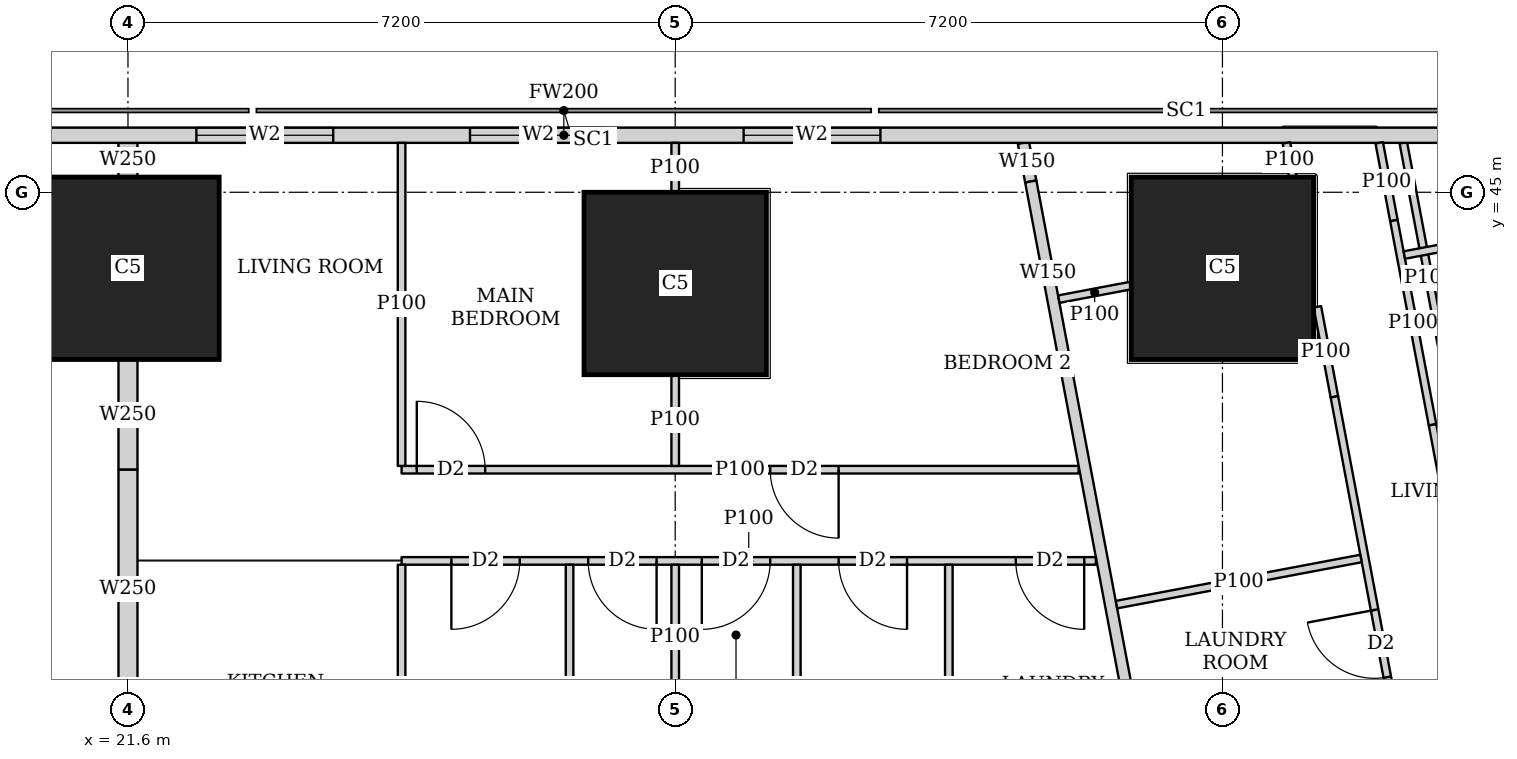
"""IFC4 building model, lengths in metres.
Left out: names, types, materials, properties, quantities, classifications, styles, units other than length and angle.
Written with IfcOpenShell. Run it as: python <this file> out.ifc"""

import sys

from ifc_helpers import new_model, si_unit, direction, frame, frame_2d, origin, origin_2d, place, context, subcontext, project, spatial, rectangle, extrude, element, fill, save


model = new_model("IFC4")
c1 = context("Model", 3, precision=1e-05, world=origin(), true_north=direction((0.0, 1.0)))
c2 = subcontext(c1, "Body", "Model", "MODEL_VIEW")
j1 = project(units=[si_unit("LENGTHUNIT", "METRE"), si_unit("PLANEANGLEUNIT", "RADIAN")], contexts=[c1])
p1 = place(None, origin())
s1 = spatial("IfcSite", under=j1, at=p1, CompositionType="ELEMENT")
p2 = place(p1, origin())
s2 = spatial("IfcBuilding", under=s1, at=p2, CompositionType="ELEMENT")
p3 = place(p2, frame((0.0, 0.0, 234.95)))
s3 = spatial("IfcBuildingStorey", under=s2, at=p3, CompositionType="ELEMENT", Elevation=234.95)
for number, where, z_axis, x_axis in (
    (1, (21.6, 44.0, 0.0), (0.0, 0.0, 1.0), (1.0, 0.0, 0.0)),
    (2, (28.8, 43.8, 0.0), (0.0, 0.0, 1.0), (1.0, 0.0, 0.0)),
    (3, (36.0, 44.0, 0.0), (0.0, 0.0, 1.0), (1.0, 0.0, 0.0)),
):
    element("IfcColumn", number, at=place(p3, frame(where, z_axis=z_axis, x_axis=x_axis)), inside=s3, PredefinedType="COLUMN", context=c2, shape_type="SweptSolid", body=[
        extrude(rectangle(XDim=2.4, YDim=2.4, at=origin_2d()), origin(), (0.0, 0.0, 1.0), 3.75),
    ])
p4 = place(p3, frame((40.106, 45.75, 0.0), z_axis=(0.0, 0.0, 1.0), x_axis=(-1.0, 0.0, 0.0)))
e4 = element("IfcWall", 4, at=p4, inside=s3, PredefinedType="SOLIDWALL", context=c2, shape_type="SweptSolid", body=[
    extrude(rectangle(XDim=25.543, YDim=0.2, at=frame_2d((12.771, 0.0))), origin(), (0.0, 0.0, 1.0), 3.5),
])
p5 = place(p4, frame((8.606, 0.0, 0.9)))
e5 = element("IfcOpeningElement", 5, at=p5, cuts=e4, PredefinedType="OPENING", context=c2, shape_type="SweptSolid", body=[
    extrude(rectangle(XDim=1.8, YDim=1.5, at=frame_2d((0.9, 0.75))), frame((0.0, 0.11, 0.0), z_axis=(0.0, -1.0, 0.0), x_axis=(1.0, 0.0, 0.0)), (0.0, 0.0, 1.0), 0.22),
])
p6 = place(p4, frame((12.206, 0.0, 0.9)))
e6 = element("IfcOpeningElement", 6, at=p6, cuts=e4, PredefinedType="OPENING", context=c2, shape_type="SweptSolid", body=[
    extrude(rectangle(XDim=1.8, YDim=1.5, at=frame_2d((0.9, 0.75))), frame((0.0, 0.11, 0.0), z_axis=(0.0, -1.0, 0.0), x_axis=(1.0, 0.0, 0.0)), (0.0, 0.0, 1.0), 0.22),
])
p7 = place(p4, frame((15.806, 0.0, 0.9)))
e7 = element("IfcOpeningElement", 7, at=p7, cuts=e4, PredefinedType="OPENING", context=c2, shape_type="SweptSolid", body=[
    extrude(rectangle(XDim=1.8, YDim=1.5, at=frame_2d((0.9, 0.75))), frame((0.0, 0.11, 0.0), z_axis=(0.0, -1.0, 0.0), x_axis=(1.0, 0.0, 0.0)), (0.0, 0.0, 1.0), 0.22),
])
p8 = place(p4, frame((20.825, 0.0, 0.9)))
e8 = element("IfcOpeningElement", 8, at=p8, cuts=e4, PredefinedType="OPENING", context=c2, shape_type="SweptSolid", body=[
    extrude(rectangle(XDim=2.4, YDim=1.5, at=frame_2d((1.2, 0.75))), frame((0.0, 0.11, 0.0), z_axis=(0.0, -1.0, 0.0), x_axis=(1.0, 0.0, 0.0)), (0.0, 0.0, 1.0), 0.22),
])
p9 = place(p3, frame((33.382, 45.65, 0.0), z_axis=(0.0, 0.0, 1.0), x_axis=(0.185657456326, -0.982614527122, 0.0)))
e9 = element("IfcWall", 9, at=p9, inside=s3, PredefinedType="SOLIDWALL", context=c2, shape_type="SweptSolid", body=[
    extrude(rectangle(XDim=0.517, YDim=0.15, at=frame_2d((0.258, 0.0))), origin(), (0.0, 0.0, 1.0), 3.5),
])
p10 = place(p3, frame((33.478, 45.142, 0.0), z_axis=(0.0, 0.0, 1.0), x_axis=(0.185393362436, -0.982664388876, 0.0)))
e10 = element("IfcWall", 10, at=p10, inside=s3, PredefinedType="SOLIDWALL", context=c2, shape_type="SweptSolid", body=[
    extrude(rectangle(XDim=2.455, YDim=0.15, at=frame_2d((1.227, 0.0))), origin(), (0.0, 0.0, 1.0), 2.05),
])
p11 = place(p3, frame((33.933, 42.73, 0.0), z_axis=(0.0, 0.0, 1.0), x_axis=(0.185595417643, -0.982626246825, 0.0)))
e11 = element("IfcWall", 11, at=p11, inside=s3, PredefinedType="SOLIDWALL", context=c2, shape_type="SweptSolid", body=[
    extrude(rectangle(XDim=41.051, YDim=0.15, at=frame_2d((20.525, 0.0))), origin(), (0.0, 0.0, 1.0), 2.5),
])
p12 = place(p11, frame((12.266, 0.0, 0.0)))
e12 = element("IfcOpeningElement", 12, at=p12, cuts=e11, PredefinedType="OPENING", context=c2, shape_type="SweptSolid", body=[
    extrude(rectangle(XDim=1.0, YDim=2.1, at=frame_2d((0.5, 1.05))), frame((0.0, 0.085, 0.0), z_axis=(0.0, -1.0, 0.0), x_axis=(1.0, 0.0, 0.0)), (0.0, 0.0, 1.0), 0.17),
])
p13 = place(p11, frame((16.082, 0.0, 0.0)))
e13 = element("IfcOpeningElement", 13, at=p13, cuts=e11, PredefinedType="OPENING", context=c2, shape_type="SweptSolid", body=[
    extrude(rectangle(XDim=1.0, YDim=2.1, at=frame_2d((0.5, 1.05))), frame((0.0, 0.085, 0.0), z_axis=(0.0, -1.0, 0.0), x_axis=(1.0, 0.0, 0.0)), (0.0, 0.0, 1.0), 0.17),
])
p14 = place(p11, frame((30.862, 0.0, 0.0)))
e14 = element("IfcOpeningElement", 14, at=p14, cuts=e11, PredefinedType="OPENING", context=c2, shape_type="SweptSolid", body=[
    extrude(rectangle(XDim=1.0, YDim=2.1, at=frame_2d((0.5, 1.05))), frame((0.0, 0.085, 0.0), z_axis=(0.0, -1.0, 0.0), x_axis=(1.0, 0.0, 0.0)), (0.0, 0.0, 1.0), 0.17),
])
p15 = place(p3, frame((39.054, 42.085, 0.0), z_axis=(0.0, 0.0, 1.0), x_axis=(-0.185791584218, 0.982589175207, 0.0)))
e15 = element("IfcWall", 15, at=p15, inside=s3, PredefinedType="PARTITIONING", context=c2, shape_type="SweptSolid", body=[
    extrude(rectangle(XDim=3.628, YDim=0.1, at=frame_2d((1.814, 0.0))), origin(), (0.0, 0.0, 1.0), 2.05),
])
p16 = place(p3, frame((38.063, 45.65, 0.0), z_axis=(0.0, 0.0, 1.0), x_axis=(0.185677287841, -0.982610779902, 0.0)))
e16 = element("IfcWall", 16, at=p16, inside=s3, PredefinedType="PARTITIONING", context=c2, shape_type="SweptSolid", body=[
    extrude(rectangle(XDim=1.04, YDim=0.1, at=frame_2d((0.52, 0.0))), origin(), (0.0, 0.0, 1.0), 3.5),
])
p17 = place(p3, frame((38.256, 44.628, 0.0), z_axis=(0.0, 0.0, 1.0), x_axis=(0.185700639943, -0.982606366927, 0.0)))
e17 = element("IfcWall", 17, at=p17, inside=s3, PredefinedType="PARTITIONING", context=c2, shape_type="SweptSolid", body=[
    extrude(rectangle(XDim=2.735, YDim=0.1, at=frame_2d((1.367, 0.0))), origin(), (0.0, 0.0, 1.0), 2.05),
])
p18 = place(p3, frame((38.764, 41.941, 0.0), z_axis=(0.0, 0.0, 1.0), x_axis=(0.185548572312, -0.982635093671, 0.0)))
e18 = element("IfcWall", 18, at=p18, inside=s3, PredefinedType="PARTITIONING", context=c2, shape_type="SweptSolid", body=[
    extrude(rectangle(XDim=9.135, YDim=0.1, at=frame_2d((4.568, 0.0))), origin(), (0.0, 0.0, 1.0), 3.5),
])
p19 = place(p18, frame((8.085, 0.0, 0.0)))
e19 = element("IfcOpeningElement", 19, at=p19, cuts=e18, PredefinedType="OPENING", context=c2, shape_type="SweptSolid", body=[
    extrude(rectangle(XDim=0.9, YDim=2.1, at=frame_2d((0.45, 1.05))), frame((0.0, 0.06, 0.0), z_axis=(0.0, -1.0, 0.0), x_axis=(1.0, 0.0, 0.0)), (0.0, 0.0, 1.0), 0.12),
])
p20 = place(p18, frame((3.7, 0.0, 0.0)))
e20 = element("IfcOpeningElement", 20, at=p20, cuts=e18, PredefinedType="OPENING", context=c2, shape_type="SweptSolid", body=[
    extrude(rectangle(XDim=0.9, YDim=2.1, at=frame_2d((0.45, 1.05))), frame((0.0, 0.06, 0.0), z_axis=(0.0, -1.0, 0.0), x_axis=(1.0, 0.0, 0.0)), (0.0, 0.0, 1.0), 0.12),
])
p21 = place(p3, frame((36.842, 45.65, 0.0), z_axis=(0.0, 0.0, 1.0), x_axis=(0.185407859198, -0.982661653748, 0.0)))
e21 = element("IfcWall", 21, at=p21, inside=s3, PredefinedType="PARTITIONING", context=c2, shape_type="SweptSolid", body=[
    extrude(rectangle(XDim=0.448, YDim=0.1, at=frame_2d((0.224, 0.0))), origin(), (0.0, 0.0, 1.0), 3.5),
])
p22 = place(p3, frame((37.249, 43.493, 0.0), z_axis=(0.0, 0.0, 1.0), x_axis=(0.185817643817, -0.982584247404, 0.0)))
e22 = element("IfcWall", 22, at=p22, inside=s3, PredefinedType="PARTITIONING", context=c2, shape_type="SweptSolid", body=[
    extrude(rectangle(XDim=1.205, YDim=0.1, at=frame_2d((0.603, 0.0))), origin(), (0.0, 0.0, 1.0), 2.05),
])
p23 = place(p3, frame((37.473, 42.309, 0.0), z_axis=(0.0, 0.0, 1.0), x_axis=(0.185491912953, -0.982645790827, 0.0)))
e23 = element("IfcWall", 23, at=p23, inside=s3, PredefinedType="PARTITIONING", context=c2, shape_type="SweptSolid", body=[
    extrude(rectangle(XDim=9.737, YDim=0.1, at=frame_2d((4.869, 0.0))), origin(), (0.0, 0.0, 1.0), 3.5),
])
p24 = place(p23, frame((8.232, 0.0, 0.0)))
e24 = element("IfcOpeningElement", 24, at=p24, cuts=e23, PredefinedType="OPENING", context=c2, shape_type="SweptSolid", body=[
    extrude(rectangle(XDim=0.9, YDim=2.1, at=frame_2d((0.45, 1.05))), frame((0.0, 0.06, 0.0), z_axis=(0.0, -1.0, 0.0), x_axis=(1.0, 0.0, 0.0)), (0.0, 0.0, 1.0), 0.12),
])
p25 = place(p23, frame((2.853, 0.0, 0.0)))
e25 = element("IfcOpeningElement", 25, at=p25, cuts=e23, PredefinedType="OPENING", context=c2, shape_type="SweptSolid", body=[
    extrude(rectangle(XDim=0.9, YDim=2.1, at=frame_2d((0.45, 1.05))), frame((0.0, 0.06, 0.0), z_axis=(0.0, -1.0, 0.0), x_axis=(1.0, 0.0, 0.0)), (0.0, 0.0, 1.0), 0.12),
])
p26 = place(p23, frame((5.564, 0.0, 0.0)))
e26 = element("IfcOpeningElement", 26, at=p26, cuts=e23, PredefinedType="OPENING", context=c2, shape_type="SweptSolid", body=[
    extrude(rectangle(XDim=0.9, YDim=2.1, at=frame_2d((0.45, 1.05))), frame((0.0, 0.06, 0.0), z_axis=(0.0, -1.0, 0.0), x_axis=(1.0, 0.0, 0.0)), (0.0, 0.0, 1.0), 0.12),
])
p27 = place(p3, frame((41.968, 44.85, 0.0), z_axis=(0.0, 0.0, 1.0), x_axis=(-0.98258614234, -0.185807623311, 0.0)))
e27 = element("IfcWall", 27, at=p27, inside=s3, PredefinedType="PARTITIONING", context=c2, shape_type="SweptSolid", body=[
    extrude(rectangle(XDim=3.638, YDim=0.1, at=frame_2d((1.819, 0.0))), origin(), (0.0, 0.0, 1.0), 2.05),
])
p28 = place(p3, frame((34.79, 43.772, 0.0), z_axis=(0.0, 0.0, 1.0), x_axis=(-0.982655532093, -0.185440301034, 0.0)))
e28 = element("IfcWall", 28, at=p28, inside=s3, PredefinedType="PARTITIONING", context=c2, shape_type="SweptSolid", body=[
    extrude(rectangle(XDim=0.96, YDim=0.1, at=frame_2d((0.48, 0.0))), origin(), (0.0, 0.0, 1.0), 2.05),
])
p29 = place(p3, frame((37.823, 40.182, 0.0), z_axis=(0.0, 0.0, 1.0), x_axis=(-0.982664729897, -0.18539155487, 0.0)))
e29 = element("IfcWall", 29, at=p29, inside=s3, PredefinedType="PARTITIONING", context=c2, shape_type="SweptSolid", body=[
    extrude(rectangle(XDim=3.274, YDim=0.1, at=frame_2d((1.637, 0.0))), origin(), (0.0, 0.0, 1.0), 3.5),
])
p30 = place(p3, frame((25.2, 41.35, 0.0), z_axis=(0.0, 0.0, 1.0), x_axis=(1.0, 0.0, 0.0)))
e30 = element("IfcWall", 30, at=p30, inside=s3, PredefinedType="PARTITIONING", context=c2, shape_type="SweptSolid", body=[
    extrude(rectangle(XDim=8.908, YDim=0.1, at=frame_2d((4.454, 0.0))), origin(), (0.0, 0.0, 1.0), 3.5),
])
p31 = place(p30, frame((0.2, 0.0, 0.0)))
e31 = element("IfcOpeningElement", 31, at=p31, cuts=e30, PredefinedType="OPENING", context=c2, shape_type="SweptSolid", body=[
    extrude(rectangle(XDim=0.9, YDim=2.1, at=frame_2d((0.45, 1.05))), frame((0.0, 0.06, 0.0), z_axis=(0.0, -1.0, 0.0), x_axis=(1.0, 0.0, 0.0)), (0.0, 0.0, 1.0), 0.12),
])
p32 = place(p30, frame((4.85, 0.0, 0.0)))
e32 = element("IfcOpeningElement", 32, at=p32, cuts=e30, PredefinedType="OPENING", context=c2, shape_type="SweptSolid", body=[
    extrude(rectangle(XDim=0.9, YDim=2.1, at=frame_2d((0.45, 1.05))), frame((0.0, 0.06, 0.0), z_axis=(0.0, -1.0, 0.0), x_axis=(1.0, 0.0, 0.0)), (0.0, 0.0, 1.0), 0.12),
])
p33 = place(p3, frame((25.2, 40.15, 0.0), z_axis=(0.0, 0.0, 1.0), x_axis=(1.0, 0.0, 0.0)))
e33 = element("IfcWall", 33, at=p33, inside=s3, PredefinedType="PARTITIONING", context=c2, shape_type="SweptSolid", body=[
    extrude(rectangle(XDim=9.135, YDim=0.1, at=frame_2d((4.567, 0.0))), origin(), (0.0, 0.0, 1.0), 3.5),
])
p34 = place(p33, frame((0.655, 0.0, 0.0)))
e34 = element("IfcOpeningElement", 34, at=p34, cuts=e33, PredefinedType="OPENING", context=c2, shape_type="SweptSolid", body=[
    extrude(rectangle(XDim=0.9, YDim=2.1, at=frame_2d((0.45, 1.05))), frame((0.0, 0.06, 0.0), z_axis=(0.0, -1.0, 0.0), x_axis=(1.0, 0.0, 0.0)), (0.0, 0.0, 1.0), 0.12),
])
p35 = place(p33, frame((3.95, 0.0, 0.0)))
e35 = element("IfcOpeningElement", 35, at=p35, cuts=e33, PredefinedType="OPENING", context=c2, shape_type="SweptSolid", body=[
    extrude(rectangle(XDim=0.9, YDim=2.1, at=frame_2d((0.45, 1.05))), frame((0.0, 0.06, 0.0), z_axis=(0.0, -1.0, 0.0), x_axis=(1.0, 0.0, 0.0)), (0.0, 0.0, 1.0), 0.12),
])
p36 = place(p33, frame((8.081, 0.0, 0.0)))
e36 = element("IfcOpeningElement", 36, at=p36, cuts=e33, PredefinedType="OPENING", context=c2, shape_type="SweptSolid", body=[
    extrude(rectangle(XDim=0.9, YDim=2.1, at=frame_2d((0.45, 1.05))), frame((0.0, 0.06, 0.0), z_axis=(0.0, -1.0, 0.0), x_axis=(1.0, 0.0, 0.0)), (0.0, 0.0, 1.0), 0.12),
])
p37 = place(p33, frame((2.455, 0.0, 0.0)))
e37 = element("IfcOpeningElement", 37, at=p37, cuts=e33, PredefinedType="OPENING", context=c2, shape_type="SweptSolid", body=[
    extrude(rectangle(XDim=0.9, YDim=2.1, at=frame_2d((0.45, 1.05))), frame((0.0, 0.06, 0.0), z_axis=(0.0, -1.0, 0.0), x_axis=(1.0, 0.0, 0.0)), (0.0, 0.0, 1.0), 0.12),
])
p38 = place(p33, frame((5.75, 0.0, 0.0)))
e38 = element("IfcOpeningElement", 38, at=p38, cuts=e33, PredefinedType="OPENING", context=c2, shape_type="SweptSolid", body=[
    extrude(rectangle(XDim=0.9, YDim=2.1, at=frame_2d((0.45, 1.05))), frame((0.0, 0.06, 0.0), z_axis=(0.0, -1.0, 0.0), x_axis=(1.0, 0.0, 0.0)), (0.0, 0.0, 1.0), 0.12),
])
p39 = place(p3, frame((25.2, 41.4, 0.0), z_axis=(0.0, 0.0, 1.0), x_axis=(0.0, 1.0, 0.0)))
e39 = element("IfcWall", 39, at=p39, inside=s3, PredefinedType="PARTITIONING", context=c2, shape_type="SweptSolid", body=[
    extrude(rectangle(XDim=4.25, YDim=0.1, at=frame_2d((2.125, 0.0))), origin(), (0.0, 0.0, 1.0), 2.05),
])
p40 = place(p3, frame((28.8, 41.4, 0.0), z_axis=(0.0, 0.0, 1.0), x_axis=(0.0, 1.0, 0.0)))
e40 = element("IfcWall", 40, at=p40, inside=s3, PredefinedType="PARTITIONING", context=c2, shape_type="SweptSolid", body=[
    extrude(rectangle(XDim=1.199, YDim=0.1, at=frame_2d((0.6, 0.0))), origin(), (0.0, 0.0, 1.0), 3.5),
])
p41 = place(p3, frame((28.8, 45.001, 0.0), z_axis=(0.0, 0.0, 1.0), x_axis=(0.0, 1.0, 0.0)))
e41 = element("IfcWall", 41, at=p41, inside=s3, PredefinedType="PARTITIONING", context=c2, shape_type="SweptSolid", body=[
    extrude(rectangle(XDim=0.649, YDim=0.1, at=frame_2d((0.324, 0.0))), origin(), (0.0, 0.0, 1.0), 3.5),
])
p42 = place(p3, frame((25.2, 36.825, 0.0), z_axis=(0.0, 0.0, 1.0), x_axis=(0.0, 1.0, 0.0)))
e42 = element("IfcWall", 42, at=p42, inside=s3, PredefinedType="PARTITIONING", context=c2, shape_type="SweptSolid", body=[
    extrude(rectangle(XDim=3.275, YDim=0.1, at=frame_2d((1.638, 0.0))), origin(), (0.0, 0.0, 1.0), 3.5),
])
p43 = place(p3, frame((28.8, 38.201, 0.0), z_axis=(0.0, 0.0, 1.0), x_axis=(0.0, 1.0, 0.0)))
e43 = element("IfcWall", 43, at=p43, inside=s3, PredefinedType="PARTITIONING", context=c2, shape_type="SweptSolid", body=[
    extrude(rectangle(XDim=1.899, YDim=0.1, at=frame_2d((0.95, 0.0))), origin(), (0.0, 0.0, 1.0), 3.5),
])
for number, where, z_axis, x_axis in (
    (44, (32.4, 36.825, 0.0), (0.0, 0.0, 1.0), (0.0, 1.0, 0.0)),
    (45, (27.41, 36.825, 0.0), (0.0, 0.0, 1.0), (0.0, 1.0, 0.0)),
    (46, (30.4, 36.825, 0.0), (0.0, 0.0, 1.0), (0.0, 1.0, 0.0)),
):
    element("IfcWall", number, at=place(p3, frame(where, z_axis=z_axis, x_axis=x_axis)), inside=s3, PredefinedType="PARTITIONING", context=c2, shape_type="SweptSolid", body=[
        extrude(rectangle(XDim=3.275, YDim=0.1, at=frame_2d((1.638, 0.0))), origin(), (0.0, 0.0, 1.0), 3.5),
    ])
p44 = place(p3, frame((21.6, 41.35, 0.0), z_axis=(0.0, 0.0, 1.0), x_axis=(0.0, 1.0, 0.0)))
e47 = element("IfcWall", 47, at=p44, inside=s3, PredefinedType="SOLIDWALL", context=c2, shape_type="SweptSolid", body=[
    extrude(rectangle(XDim=1.449, YDim=0.25, at=frame_2d((0.725, 0.0))), origin(), (0.0, 0.0, 1.0), 2.05),
])
p45 = place(p3, frame((21.6, 45.201, 0.0), z_axis=(0.0, 0.0, 1.0), x_axis=(0.0, 1.0, 0.0)))
e48 = element("IfcWall", 48, at=p45, inside=s3, PredefinedType="SOLIDWALL", context=c2, shape_type="SweptSolid", body=[
    extrude(rectangle(XDim=0.449, YDim=0.25, at=frame_2d((0.225, 0.0))), origin(), (0.0, 0.0, 1.0), 2.05),
])
p46 = place(p3, frame((21.6, 38.201, 0.0), z_axis=(0.0, 0.0, 1.0), x_axis=(0.0, 1.0, 0.0)))
e49 = element("IfcWall", 49, at=p46, inside=s3, PredefinedType="SOLIDWALL", context=c2, shape_type="SweptSolid", body=[
    extrude(rectangle(XDim=3.149, YDim=0.25, at=frame_2d((1.575, 0.0))), origin(), (0.0, 0.0, 1.0), 3.5),
])
p47 = place(p5, origin())
e50 = element("IfcWindow", 50, at=p47, inside=s3, PartitioningType="SINGLE_PANEL", PredefinedType="WINDOW", context=c2, shape_type="SweptSolid", body=[
    extrude(rectangle(XDim=1.8, YDim=1.5, at=frame_2d((0.9, 0.75))), frame((0.0, 0.03, 0.0), z_axis=(0.0, -1.0, 0.0), x_axis=(1.0, 0.0, 0.0)), (0.0, 0.0, 1.0), 0.06),
])
fill(e5, e50)
p48 = place(p6, origin())
e51 = element("IfcWindow", 51, at=p48, inside=s3, PartitioningType="SINGLE_PANEL", PredefinedType="WINDOW", context=c2, shape_type="SweptSolid", body=[
    extrude(rectangle(XDim=1.8, YDim=1.5, at=frame_2d((0.9, 0.75))), frame((0.0, 0.03, 0.0), z_axis=(0.0, -1.0, 0.0), x_axis=(1.0, 0.0, 0.0)), (0.0, 0.0, 1.0), 0.06),
])
fill(e6, e51)
p49 = place(p7, origin())
e52 = element("IfcWindow", 52, at=p49, inside=s3, PartitioningType="SINGLE_PANEL", PredefinedType="WINDOW", context=c2, shape_type="SweptSolid", body=[
    extrude(rectangle(XDim=1.8, YDim=1.5, at=frame_2d((0.9, 0.75))), frame((0.0, 0.03, 0.0), z_axis=(0.0, -1.0, 0.0), x_axis=(1.0, 0.0, 0.0)), (0.0, 0.0, 1.0), 0.06),
])
fill(e7, e52)
p50 = place(p25, origin())
e53 = element("IfcDoor", 53, at=p50, inside=s3, OperationType="SINGLE_SWING_RIGHT", PredefinedType="DOOR", context=c2, shape_type="SweptSolid", body=[
    extrude(rectangle(XDim=0.9, YDim=2.1, at=frame_2d((0.45, 1.05))), frame((0.0, 0.025, 0.0), z_axis=(0.0, -1.0, 0.0), x_axis=(1.0, 0.0, 0.0)), (0.0, 0.0, 1.0), 0.05),
])
fill(e25, e53)
p51 = place(p31, origin())
e54 = element("IfcDoor", 54, at=p51, inside=s3, OperationType="SINGLE_SWING_LEFT", PredefinedType="DOOR", context=c2, shape_type="SweptSolid", body=[
    extrude(rectangle(XDim=0.9, YDim=2.1, at=frame_2d((0.45, 1.05))), frame((0.0, 0.025, 0.0), z_axis=(0.0, -1.0, 0.0), x_axis=(1.0, 0.0, 0.0)), (0.0, 0.0, 1.0), 0.05),
])
fill(e31, e54)
p52 = place(p32, origin())
e55 = element("IfcDoor", 55, at=p52, inside=s3, OperationType="SINGLE_SWING_LEFT", PredefinedType="DOOR", context=c2, shape_type="SweptSolid", body=[
    extrude(rectangle(XDim=0.9, YDim=2.1, at=frame_2d((0.45, 1.05))), frame((0.0, 0.025, 0.0), z_axis=(0.0, -1.0, 0.0), x_axis=(1.0, 0.0, 0.0)), (0.0, 0.0, 1.0), 0.05),
])
fill(e32, e55)
p53 = place(p34, origin())
e56 = element("IfcDoor", 56, at=p53, inside=s3, OperationType="SINGLE_SWING_RIGHT", PredefinedType="DOOR", context=c2, shape_type="SweptSolid", body=[
    extrude(rectangle(XDim=0.9, YDim=2.1, at=frame_2d((0.45, 1.05))), frame((0.0, 0.025, 0.0), z_axis=(0.0, -1.0, 0.0), x_axis=(1.0, 0.0, 0.0)), (0.0, 0.0, 1.0), 0.05),
])
fill(e34, e56)
p54 = place(p35, origin())
e57 = element("IfcDoor", 57, at=p54, inside=s3, OperationType="SINGLE_SWING_RIGHT", PredefinedType="DOOR", context=c2, shape_type="SweptSolid", body=[
    extrude(rectangle(XDim=0.9, YDim=2.1, at=frame_2d((0.45, 1.05))), frame((0.0, 0.025, 0.0), z_axis=(0.0, -1.0, 0.0), x_axis=(1.0, 0.0, 0.0)), (0.0, 0.0, 1.0), 0.05),
])
fill(e35, e57)
p55 = place(p36, origin())
e58 = element("IfcDoor", 58, at=p55, inside=s3, OperationType="SINGLE_SWING_LEFT", PredefinedType="DOOR", context=c2, shape_type="SweptSolid", body=[
    extrude(rectangle(XDim=0.9, YDim=2.1, at=frame_2d((0.45, 1.05))), frame((0.0, 0.025, 0.0), z_axis=(0.0, -1.0, 0.0), x_axis=(1.0, 0.0, 0.0)), (0.0, 0.0, 1.0), 0.05),
])
fill(e36, e58)
p56 = place(p37, origin())
e59 = element("IfcDoor", 59, at=p56, inside=s3, OperationType="SINGLE_SWING_LEFT", PredefinedType="DOOR", context=c2, shape_type="SweptSolid", body=[
    extrude(rectangle(XDim=0.9, YDim=2.1, at=frame_2d((0.45, 1.05))), frame((0.0, 0.025, 0.0), z_axis=(0.0, -1.0, 0.0), x_axis=(1.0, 0.0, 0.0)), (0.0, 0.0, 1.0), 0.05),
])
fill(e37, e59)
p57 = place(p38, origin())
e60 = element("IfcDoor", 60, at=p57, inside=s3, OperationType="SINGLE_SWING_LEFT", PredefinedType="DOOR", context=c2, shape_type="SweptSolid", body=[
    extrude(rectangle(XDim=0.9, YDim=2.1, at=frame_2d((0.45, 1.05))), frame((0.0, 0.025, 0.0), z_axis=(0.0, -1.0, 0.0), x_axis=(1.0, 0.0, 0.0)), (0.0, 0.0, 1.0), 0.05),
])
fill(e38, e60)
save(model, sys.argv[1])
